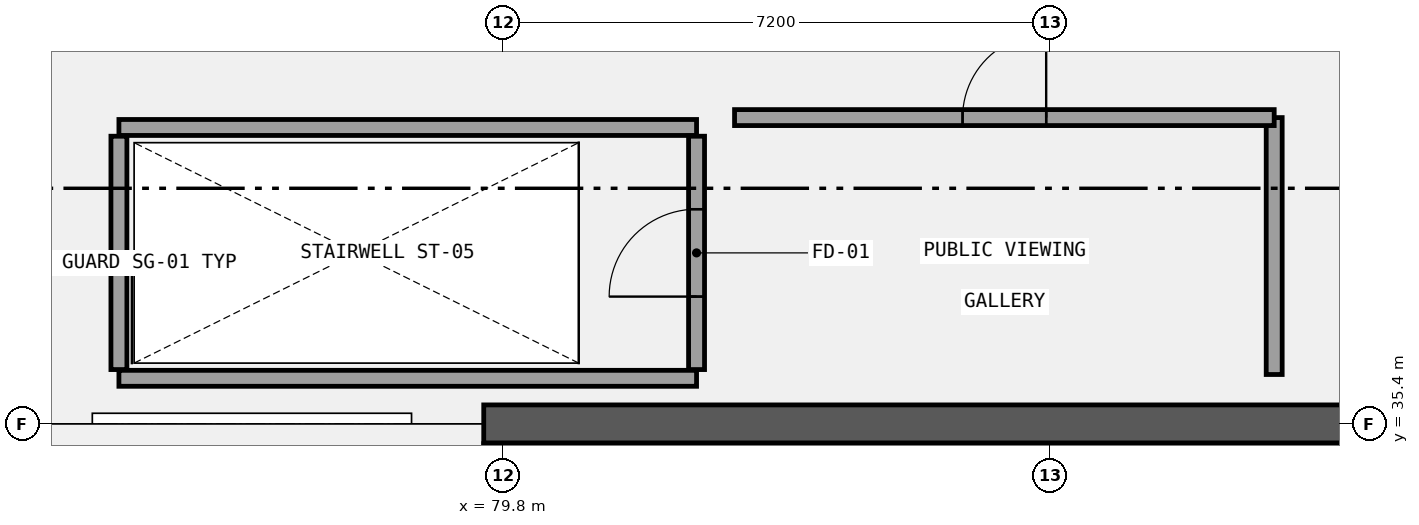
"""IFC4 building model, lengths in metres.
Left out: names, types, materials, properties, quantities, classifications, styles, units other than length and angle.
Written with IfcOpenShell. Run it as: python <this file> out.ifc"""

import sys

from ifc_helpers import new_model, si_unit, direction, frame, frame_2d, origin, place, context, subcontext, project, spatial, rectangle, extrude, element, fill, save


model = new_model("IFC4")
c1 = context("Model", 3, precision=1e-05, world=origin(), true_north=direction((0.0, 1.0)))
c2 = subcontext(c1, "Body", "Model", "MODEL_VIEW")
j1 = project(units=[si_unit("LENGTHUNIT", "METRE"), si_unit("PLANEANGLEUNIT", "RADIAN")], contexts=[c1])
p1 = place(None, origin())
s1 = spatial("IfcSite", under=j1, at=p1, CompositionType="ELEMENT")
p2 = place(p1, origin())
s2 = spatial("IfcBuilding", under=s1, at=p2, CompositionType="ELEMENT")
p3 = place(p2, frame((0.0, 0.0, 5.4)))
s3 = spatial("IfcBuildingStorey", under=s2, at=p3, CompositionType="ELEMENT", Elevation=5.4)
p4 = place(p3, frame((79.55, 35.4, 0.0), z_axis=(0.0, 0.0, 1.0), x_axis=(1.0, 0.0, 0.0)))
e1 = element("IfcWall", 1, at=p4, inside=s3, PredefinedType="SHEAR", context=c2, shape_type="SweptSolid", body=[
    extrude(rectangle(XDim=14.9, YDim=0.5, at=frame_2d((7.45, 0.0))), origin(), (0.0, 0.0, 1.0), 4.2),
])
p5 = place(p3, frame((79.8, 28.46, 0.0), z_axis=(0.0, 0.0, 1.0), x_axis=(0.0, 1.0, 0.0)))
e2 = element("IfcWall", 2, at=p5, inside=s3, PredefinedType="SHEAR", context=c2, shape_type="SweptSolid", body=[
    extrude(rectangle(XDim=6.68, YDim=0.5, at=frame_2d((3.34, 0.0))), origin(), (0.0, 0.0, 1.0), 4.2),
])
for number, where, z_axis, x_axis in (
    (3, (87.78, 32.08, 0.0), (0.0, 0.0, 1.0), (0.0, 1.0, 0.0)),
    (4, (89.7, 32.08, 0.0), (0.0, 0.0, 1.0), (0.0, 1.0, 0.0)),
):
    element("IfcWall", number, at=place(p3, frame(where, z_axis=z_axis, x_axis=x_axis)), inside=s3, PredefinedType="SHEAR", context=c2, shape_type="SweptSolid", body=[
        extrude(rectangle(XDim=3.06, YDim=0.5, at=frame_2d((1.53, 0.0))), origin(), (0.0, 0.0, 1.0), 4.2),
    ])
for number, where, z_axis, x_axis in (
    (5, (74.75, 36.0, 0.0), (0.0, 0.0, 1.0), (1.0, 0.0, 0.0)),
    (6, (74.75, 39.3, 0.0), (0.0, 0.0, 1.0), (1.0, 0.0, 0.0)),
):
    element("IfcWall", number, at=place(p3, frame(where, z_axis=z_axis, x_axis=x_axis)), inside=s3, PredefinedType="PARTITIONING", context=c2, shape_type="SweptSolid", body=[
        extrude(rectangle(XDim=7.6, YDim=0.21, at=frame_2d((3.8, 0.0))), origin(), (0.0, 0.0, 1.0), 3.92),
    ])
p6 = place(p3, frame((74.75, 36.115, 0.0), z_axis=(0.0, 0.0, 1.0), x_axis=(0.0, 1.0, 0.0)))
e7 = element("IfcWall", 7, at=p6, inside=s3, PredefinedType="PARTITIONING", context=c2, shape_type="SweptSolid", body=[
    extrude(rectangle(XDim=3.07, YDim=0.21, at=frame_2d((1.535, 0.0))), origin(), (0.0, 0.0, 1.0), 3.92),
])
p7 = place(p3, frame((82.35, 36.115, 0.0), z_axis=(0.0, 0.0, 1.0), x_axis=(0.0, 1.0, 0.0)))
e8 = element("IfcWall", 8, at=p7, inside=s3, PredefinedType="PARTITIONING", context=c2, shape_type="SweptSolid", body=[
    extrude(rectangle(XDim=3.07, YDim=0.21, at=frame_2d((1.535, 0.0))), origin(), (0.0, 0.0, 1.0), 3.92),
])
p8 = place(p7, frame((0.96, 0.0, 0.0)))
e9 = element("IfcOpeningElement", 9, at=p8, cuts=e8, PredefinedType="OPENING", context=c2, shape_type="SweptSolid", body=[
    extrude(rectangle(XDim=1.15, YDim=2.15, at=frame_2d((0.575, 1.075))), frame((0.0, 0.115, 0.0), z_axis=(0.0, -1.0, 0.0), x_axis=(1.0, 0.0, 0.0)), (0.0, 0.0, 1.0), 0.23),
])
p9 = place(p3, frame((89.95, 36.05, 0.0), z_axis=(0.0, 0.0, 1.0), x_axis=(0.0, 1.0, 0.0)))
e10 = element("IfcWall", 10, at=p9, inside=s3, PredefinedType="PARTITIONING", context=c2, shape_type="SweptSolid", body=[
    extrude(rectangle(XDim=3.38, YDim=0.21, at=frame_2d((1.69, 0.0))), origin(), (0.0, 0.0, 1.0), 3.92),
])
p10 = place(p3, frame((82.85, 39.43, 0.0), z_axis=(0.0, 0.0, 1.0), x_axis=(1.0, 0.0, 0.0)))
e11 = element("IfcWall", 11, at=p10, inside=s3, PredefinedType="PARTITIONING", context=c2, shape_type="SweptSolid", body=[
    extrude(rectangle(XDim=7.1, YDim=0.21, at=frame_2d((3.55, 0.0))), origin(), (0.0, 0.0, 1.0), 3.92),
])
p11 = place(p10, frame((3.0, 0.0, 0.0)))
e12 = element("IfcOpeningElement", 12, at=p11, cuts=e11, PredefinedType="OPENING", context=c2, shape_type="SweptSolid", body=[
    extrude(rectangle(XDim=1.1, YDim=2.22, at=frame_2d((0.55, 1.11))), frame((0.0, 0.115, 0.0), z_axis=(0.0, -1.0, 0.0), x_axis=(1.0, 0.0, 0.0)), (0.0, 0.0, 1.0), 0.23),
])
p12 = place(p8, origin())
e13 = element("IfcDoor", 13, at=p12, inside=s3, OperationType="SINGLE_SWING_LEFT", PredefinedType="DOOR", context=c2, shape_type="SweptSolid", body=[
    extrude(rectangle(XDim=1.15, YDim=2.15, at=frame_2d((0.575, 1.075))), frame((0.0, 0.025, 0.0), z_axis=(0.0, -1.0, 0.0), x_axis=(1.0, 0.0, 0.0)), (0.0, 0.0, 1.0), 0.05),
])
fill(e9, e13)
p13 = place(p11, frame((1.1, 0.0, 0.0), z_axis=(0.0, 0.0, 1.0), x_axis=(-1.0, 0.0, 0.0)))
e14 = element("IfcDoor", 14, at=p13, inside=s3, OperationType="SINGLE_SWING_RIGHT", PredefinedType="DOOR", context=c2, shape_type="SweptSolid", body=[
    extrude(rectangle(XDim=1.1, YDim=2.22, at=frame_2d((0.55, 1.11))), frame((0.0, 0.025, 0.0), z_axis=(0.0, -1.0, 0.0), x_axis=(1.0, 0.0, 0.0)), (0.0, 0.0, 1.0), 0.05),
])
fill(e12, e14)
save(model, sys.argv[1])
